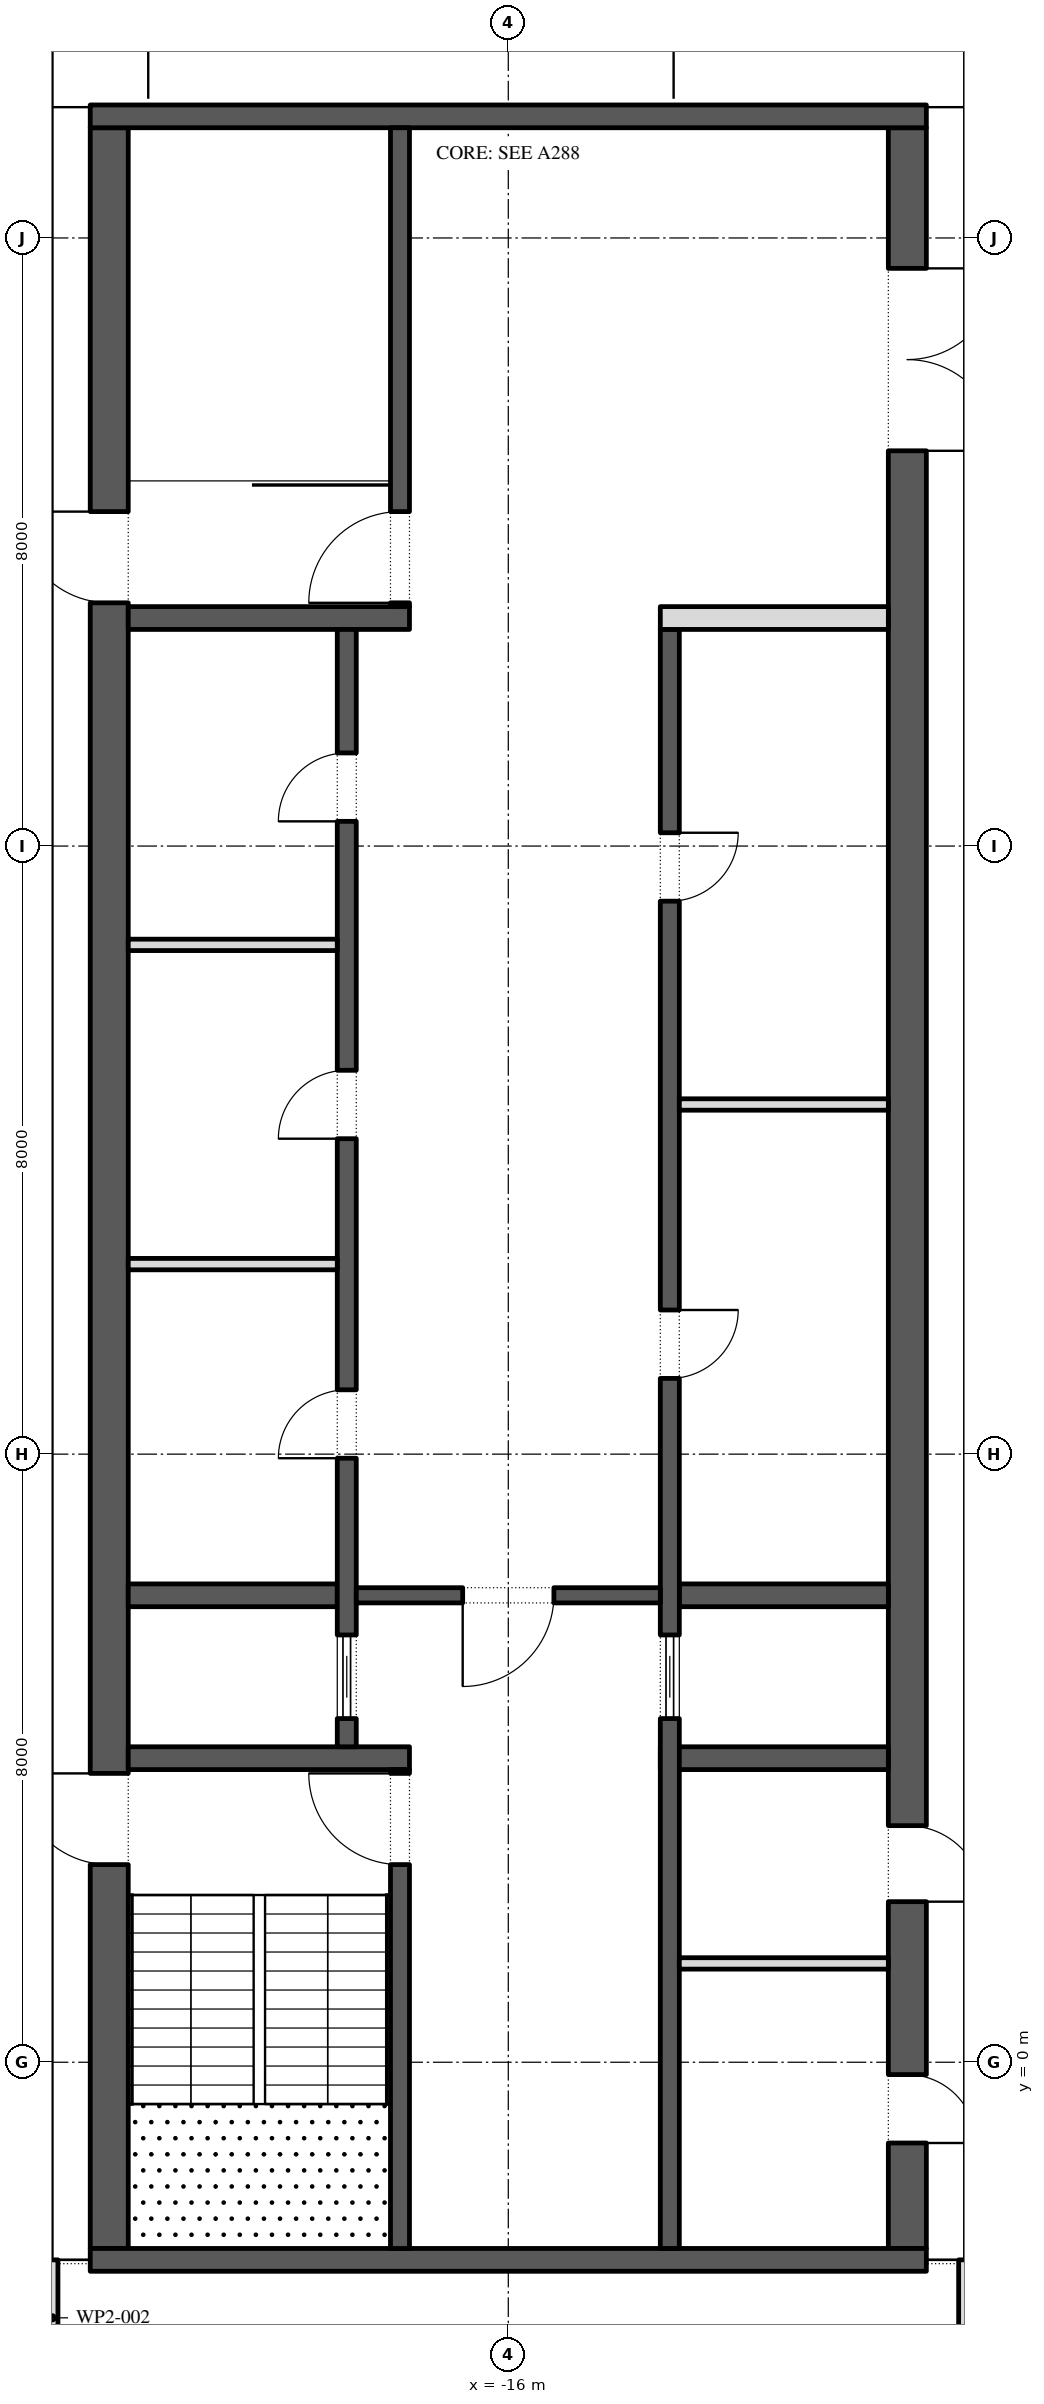
"""IFC4 building model, lengths in metres.
Left out: names, types, materials, properties, quantities, classifications, styles, units other than length and angle.
Written with IfcOpenShell. Run it as: python <this file> out.ifc"""

import sys

from ifc_helpers import new_model, si_unit, direction, frame, frame_2d, origin, place, context, subcontext, project, spatial, rectangle, extrude, element, fill, save


model = new_model("IFC4")
c1 = context("Model", 3, precision=1e-05, world=origin(), true_north=direction((0.0, 1.0)))
c2 = subcontext(c1, "Body", "Model", "MODEL_VIEW")
j1 = project(units=[si_unit("LENGTHUNIT", "METRE"), si_unit("PLANEANGLEUNIT", "RADIAN")], contexts=[c1])
p1 = place(None, origin())
s1 = spatial("IfcSite", under=j1, at=p1, CompositionType="ELEMENT")
p2 = place(p1, origin())
s2 = spatial("IfcBuilding", under=s1, at=p2, CompositionType="ELEMENT")
p3 = place(p2, frame((0.0, 0.0, 385.8)))
s3 = spatial("IfcBuildingStorey", under=s2, at=p3, CompositionType="ELEMENT", Elevation=385.8)
p4 = place(p3, frame((-21.25, -2.45, 0.0), z_axis=(0.0, 0.0, 1.0), x_axis=(0.0, 1.0, 0.0)))
e1 = element("IfcWall", 1, at=p4, inside=s3, PredefinedType="SHEAR", context=c2, shape_type="SweptSolid", body=[
    extrude(rectangle(XDim=27.9, YDim=0.5, at=frame_2d((13.95, 0.0))), origin(), (0.0, 0.0, 1.0), 4.0),
])
p5 = place(p4, frame((5.05, 0.0, 0.0)))
e2 = element("IfcOpeningElement", 2, at=p5, cuts=e1, PredefinedType="OPENING", context=c2, shape_type="SweptSolid", body=[
    extrude(rectangle(XDim=1.2, YDim=2.1, at=frame_2d((0.6, 1.05))), frame((0.0, 0.26, 0.0), z_axis=(0.0, -1.0, 0.0), x_axis=(1.0, 0.0, 0.0)), (0.0, 0.0, 1.0), 0.52),
])
p6 = place(p4, frame((21.65, 0.0, 0.0)))
e3 = element("IfcOpeningElement", 3, at=p6, cuts=e1, PredefinedType="OPENING", context=c2, shape_type="SweptSolid", body=[
    extrude(rectangle(XDim=1.2, YDim=2.1, at=frame_2d((0.6, 1.05))), frame((0.0, 0.26, 0.0), z_axis=(0.0, -1.0, 0.0), x_axis=(1.0, 0.0, 0.0)), (0.0, 0.0, 1.0), 0.52),
])
p7 = place(p3, frame((-10.75, -2.45, 0.0), z_axis=(0.0, 0.0, 1.0), x_axis=(0.0, 1.0, 0.0)))
e4 = element("IfcWall", 4, at=p7, inside=s3, PredefinedType="SHEAR", context=c2, shape_type="SweptSolid", body=[
    extrude(rectangle(XDim=27.9, YDim=0.5, at=frame_2d((13.95, 0.0))), origin(), (0.0, 0.0, 1.0), 4.0),
])
p8 = place(p7, frame((23.65, 0.0, 0.0)))
e5 = element("IfcOpeningElement", 5, at=p8, cuts=e4, PredefinedType="OPENING", context=c2, shape_type="SweptSolid", body=[
    extrude(rectangle(XDim=2.4, YDim=2.1, at=frame_2d((1.2, 1.05))), frame((0.0, 0.26, 0.0), z_axis=(0.0, -1.0, 0.0), x_axis=(1.0, 0.0, 0.0)), (0.0, 0.0, 1.0), 0.52),
])
p9 = place(p7, frame((1.387, 0.0, 0.0)))
e6 = element("IfcOpeningElement", 6, at=p9, cuts=e4, PredefinedType="OPENING", context=c2, shape_type="SweptSolid", body=[
    extrude(rectangle(XDim=0.9, YDim=2.1, at=frame_2d((0.45, 1.05))), frame((0.0, 0.26, 0.0), z_axis=(0.0, -1.0, 0.0), x_axis=(1.0, 0.0, 0.0)), (0.0, 0.0, 1.0), 0.52),
])
p10 = place(p7, frame((4.562, 0.0, 0.0)))
e7 = element("IfcOpeningElement", 7, at=p10, cuts=e4, PredefinedType="OPENING", context=c2, shape_type="SweptSolid", body=[
    extrude(rectangle(XDim=1.0, YDim=2.1, at=frame_2d((0.5, 1.05))), frame((0.0, 0.26, 0.0), z_axis=(0.0, -1.0, 0.0), x_axis=(1.0, 0.0, 0.0)), (0.0, 0.0, 1.0), 0.52),
])
for number, where, z_axis, x_axis in (
    (8, (-21.5, -2.6, 0.0), (0.0, 0.0, 1.0), (1.0, 0.0, 0.0)),
    (9, (-21.5, 25.6, 0.0), (0.0, 0.0, 1.0), (1.0, 0.0, 0.0)),
):
    element("IfcWall", number, at=place(p3, frame(where, z_axis=z_axis, x_axis=x_axis)), inside=s3, PredefinedType="SHEAR", context=c2, shape_type="SweptSolid", body=[
        extrude(rectangle(XDim=11.0, YDim=0.3, at=frame_2d((5.5, 0.0))), origin(), (0.0, 0.0, 1.0), 4.0),
    ])
p11 = place(p3, frame((-21.0, 4.0, 0.0), z_axis=(0.0, 0.0, 1.0), x_axis=(1.0, 0.0, 0.0)))
e10 = element("IfcWall", 10, at=p11, inside=s3, PredefinedType="SHEAR", context=c2, shape_type="SweptSolid", body=[
    extrude(rectangle(XDim=3.7, YDim=0.3, at=frame_2d((1.85, 0.0))), origin(), (0.0, 0.0, 1.0), 4.0),
])
p12 = place(p3, frame((-17.425, -2.45, 0.0), z_axis=(0.0, 0.0, 1.0), x_axis=(0.0, 1.0, 0.0)))
e11 = element("IfcWall", 11, at=p12, inside=s3, PredefinedType="SHEAR", context=c2, shape_type="SweptSolid", body=[
    extrude(rectangle(XDim=6.3, YDim=0.25, at=frame_2d((3.15, 0.0))), origin(), (0.0, 0.0, 1.0), 4.0),
])
p13 = place(p12, frame((5.05, 0.0, 0.0)))
e12 = element("IfcOpeningElement", 12, at=p13, cuts=e11, PredefinedType="OPENING", context=c2, shape_type="SweptSolid", body=[
    extrude(rectangle(XDim=1.2, YDim=2.1, at=frame_2d((0.6, 1.05))), frame((0.0, 0.135, 0.0), z_axis=(0.0, -1.0, 0.0), x_axis=(1.0, 0.0, 0.0)), (0.0, 0.0, 1.0), 0.27),
])
p14 = place(p3, frame((-21.0, 19.0, 0.0), z_axis=(0.0, 0.0, 1.0), x_axis=(1.0, 0.0, 0.0)))
e13 = element("IfcWall", 13, at=p14, inside=s3, PredefinedType="SHEAR", context=c2, shape_type="SweptSolid", body=[
    extrude(rectangle(XDim=3.7, YDim=0.3, at=frame_2d((1.85, 0.0))), origin(), (0.0, 0.0, 1.0), 4.0),
])
p15 = place(p3, frame((-17.425, 19.15, 0.0), z_axis=(0.0, 0.0, 1.0), x_axis=(0.0, 1.0, 0.0)))
e14 = element("IfcWall", 14, at=p15, inside=s3, PredefinedType="SHEAR", context=c2, shape_type="SweptSolid", body=[
    extrude(rectangle(XDim=6.3, YDim=0.25, at=frame_2d((3.15, 0.0))), origin(), (0.0, 0.0, 1.0), 4.0),
])
p16 = place(p15, frame((0.05, 0.0, 0.0)))
e15 = element("IfcOpeningElement", 15, at=p16, cuts=e14, PredefinedType="OPENING", context=c2, shape_type="SweptSolid", body=[
    extrude(rectangle(XDim=1.2, YDim=2.1, at=frame_2d((0.6, 1.05))), frame((0.0, 0.135, 0.0), z_axis=(0.0, -1.0, 0.0), x_axis=(1.0, 0.0, 0.0)), (0.0, 0.0, 1.0), 0.27),
])
p17 = place(p3, frame((-21.0, 6.143, 0.0), z_axis=(0.0, 0.0, 1.0), x_axis=(1.0, 0.0, 0.0)))
e16 = element("IfcWall", 16, at=p17, inside=s3, PredefinedType="SHEAR", context=c2, shape_type="SweptSolid", body=[
    extrude(rectangle(XDim=2.75, YDim=0.3, at=frame_2d((1.375, 0.0))), origin(), (0.0, 0.0, 1.0), 4.0),
])
p18 = place(p3, frame((-18.125, 4.15, 0.0), z_axis=(0.0, 0.0, 1.0), x_axis=(0.0, 1.0, 0.0)))
e17 = element("IfcWall", 17, at=p18, inside=s3, PredefinedType="SHEAR", context=c2, shape_type="SweptSolid", body=[
    extrude(rectangle(XDim=14.7, YDim=0.25, at=frame_2d((7.35, 0.0))), origin(), (0.0, 0.0, 1.0), 4.0),
])
p19 = place(p18, frame((3.796, 0.0, 0.0)))
e18 = element("IfcOpeningElement", 18, at=p19, cuts=e17, PredefinedType="OPENING", context=c2, shape_type="SweptSolid", body=[
    extrude(rectangle(XDim=0.9, YDim=2.1, at=frame_2d((0.45, 1.05))), frame((0.0, 0.135, 0.0), z_axis=(0.0, -1.0, 0.0), x_axis=(1.0, 0.0, 0.0)), (0.0, 0.0, 1.0), 0.27),
])
p20 = place(p18, frame((8.0, 0.0, 0.0)))
e19 = element("IfcOpeningElement", 19, at=p20, cuts=e17, PredefinedType="OPENING", context=c2, shape_type="SweptSolid", body=[
    extrude(rectangle(XDim=0.9, YDim=2.1, at=frame_2d((0.45, 1.05))), frame((0.0, 0.135, 0.0), z_axis=(0.0, -1.0, 0.0), x_axis=(1.0, 0.0, 0.0)), (0.0, 0.0, 1.0), 0.27),
])
p21 = place(p18, frame((12.175, 0.0, 0.0)))
e20 = element("IfcOpeningElement", 20, at=p21, cuts=e17, PredefinedType="OPENING", context=c2, shape_type="SweptSolid", body=[
    extrude(rectangle(XDim=0.9, YDim=2.1, at=frame_2d((0.45, 1.05))), frame((0.0, 0.135, 0.0), z_axis=(0.0, -1.0, 0.0), x_axis=(1.0, 0.0, 0.0)), (0.0, 0.0, 1.0), 0.27),
])
p22 = place(p18, frame((0.371, 0.0, 0.0)))
e21 = element("IfcOpeningElement", 21, at=p22, cuts=e17, PredefinedType="OPENING", context=c2, shape_type="SweptSolid", body=[
    extrude(rectangle(XDim=1.1, YDim=2.1, at=frame_2d((0.55, 1.05))), frame((0.0, 0.135, 0.0), z_axis=(0.0, -1.0, 0.0), x_axis=(1.0, 0.0, 0.0)), (0.0, 0.0, 1.0), 0.27),
])
for number, where, z_axis, x_axis in (
    (22, (-21.0, 10.5, 0.0), (0.0, 0.0, 1.0), (1.0, 0.0, 0.0)),
    (23, (-21.0, 14.7, 0.0), (0.0, 0.0, 1.0), (1.0, 0.0, 0.0)),
):
    element("IfcWall", number, at=place(p3, frame(where, z_axis=z_axis, x_axis=x_axis)), inside=s3, PredefinedType="PARTITIONING", context=c2, shape_type="SweptSolid", body=[
        extrude(rectangle(XDim=2.75, YDim=0.15, at=frame_2d((1.375, 0.0))), origin(), (0.0, 0.0, 1.0), 4.0),
    ])
p23 = place(p3, frame((-14.0, 4.0, 0.0), z_axis=(0.0, 0.0, 1.0), x_axis=(1.0, 0.0, 0.0)))
e24 = element("IfcWall", 24, at=p23, inside=s3, PredefinedType="SHEAR", context=c2, shape_type="SweptSolid", body=[
    extrude(rectangle(XDim=3.0, YDim=0.3, at=frame_2d((1.5, 0.0))), origin(), (0.0, 0.0, 1.0), 4.0),
])
p24 = place(p3, frame((-13.75, 6.143, 0.0), z_axis=(0.0, 0.0, 1.0), x_axis=(1.0, 0.0, 0.0)))
e25 = element("IfcWall", 25, at=p24, inside=s3, PredefinedType="SHEAR", context=c2, shape_type="SweptSolid", body=[
    extrude(rectangle(XDim=2.75, YDim=0.3, at=frame_2d((1.375, 0.0))), origin(), (0.0, 0.0, 1.0), 4.0),
])
p25 = place(p3, frame((-13.875, -2.45, 0.0), z_axis=(0.0, 0.0, 1.0), x_axis=(0.0, 1.0, 0.0)))
e26 = element("IfcWall", 26, at=p25, inside=s3, PredefinedType="SHEAR", context=c2, shape_type="SweptSolid", body=[
    extrude(rectangle(XDim=21.3, YDim=0.25, at=frame_2d((10.65, 0.0))), origin(), (0.0, 0.0, 1.0), 4.0),
])
p26 = place(p25, frame((11.446, 0.0, 0.0)))
e27 = element("IfcOpeningElement", 27, at=p26, cuts=e26, PredefinedType="OPENING", context=c2, shape_type="SweptSolid", body=[
    extrude(rectangle(XDim=0.9, YDim=2.1, at=frame_2d((0.45, 1.05))), frame((0.0, 0.135, 0.0), z_axis=(0.0, -1.0, 0.0), x_axis=(1.0, 0.0, 0.0)), (0.0, 0.0, 1.0), 0.27),
])
p27 = place(p25, frame((17.725, 0.0, 0.0)))
e28 = element("IfcOpeningElement", 28, at=p27, cuts=e26, PredefinedType="OPENING", context=c2, shape_type="SweptSolid", body=[
    extrude(rectangle(XDim=0.9, YDim=2.1, at=frame_2d((0.45, 1.05))), frame((0.0, 0.135, 0.0), z_axis=(0.0, -1.0, 0.0), x_axis=(1.0, 0.0, 0.0)), (0.0, 0.0, 1.0), 0.27),
])
p28 = place(p25, frame((6.971, 0.0, 0.0)))
e29 = element("IfcOpeningElement", 29, at=p28, cuts=e26, PredefinedType="OPENING", context=c2, shape_type="SweptSolid", body=[
    extrude(rectangle(XDim=1.1, YDim=2.1, at=frame_2d((0.55, 1.05))), frame((0.0, 0.135, 0.0), z_axis=(0.0, -1.0, 0.0), x_axis=(1.0, 0.0, 0.0)), (0.0, 0.0, 1.0), 0.27),
])
p29 = place(p3, frame((-14.0, 19.0, 0.0), z_axis=(0.0, 0.0, 1.0), x_axis=(1.0, 0.0, 0.0)))
e30 = element("IfcWall", 30, at=p29, inside=s3, PredefinedType="PARTITIONING", context=c2, shape_type="SweptSolid", body=[
    extrude(rectangle(XDim=3.0, YDim=0.3, at=frame_2d((1.5, 0.0))), origin(), (0.0, 0.0, 1.0), 4.0),
])
p30 = place(p3, frame((-13.75, 12.6, 0.0), z_axis=(0.0, 0.0, 1.0), x_axis=(1.0, 0.0, 0.0)))
e31 = element("IfcWall", 31, at=p30, inside=s3, PredefinedType="PARTITIONING", context=c2, shape_type="SweptSolid", body=[
    extrude(rectangle(XDim=2.75, YDim=0.15, at=frame_2d((1.375, 0.0))), origin(), (0.0, 0.0, 1.0), 4.0),
])
p31 = place(p3, frame((-18.0, 6.143, 0.0), z_axis=(0.0, 0.0, 1.0), x_axis=(1.0, 0.0, 0.0)))
e32 = element("IfcWall", 32, at=p31, inside=s3, PredefinedType="SHEAR", context=c2, shape_type="SweptSolid", body=[
    extrude(rectangle(XDim=4.0, YDim=0.2, at=frame_2d((2.0, 0.0))), origin(), (0.0, 0.0, 1.0), 4.0),
])
p32 = place(p31, frame((1.4, 0.0, 0.0)))
e33 = element("IfcOpeningElement", 33, at=p32, cuts=e32, PredefinedType="OPENING", context=c2, shape_type="SweptSolid", body=[
    extrude(rectangle(XDim=1.2, YDim=2.1, at=frame_2d((0.6, 1.05))), frame((0.0, 0.11, 0.0), z_axis=(0.0, -1.0, 0.0), x_axis=(1.0, 0.0, 0.0)), (0.0, 0.0, 1.0), 0.22),
])
p33 = place(p3, frame((-13.75, 1.3, 0.0), z_axis=(0.0, 0.0, 1.0), x_axis=(1.0, 0.0, 0.0)))
e34 = element("IfcWall", 34, at=p33, inside=s3, PredefinedType="PARTITIONING", context=c2, shape_type="SweptSolid", body=[
    extrude(rectangle(XDim=2.75, YDim=0.15, at=frame_2d((1.375, 0.0))), origin(), (0.0, 0.0, 1.0), 4.0),
])
p34 = place(p3, frame((-22.0, -2.6, 0.0), z_axis=(0.0, 0.0, 1.0), x_axis=(0.0, -1.0, 0.0)))
e35 = element("IfcWall", 35, at=p34, inside=s3, PredefinedType="PARTITIONING", context=c2, shape_type="SweptSolid", body=[
    extrude(rectangle(XDim=1.525, YDim=0.15, at=frame_2d((0.762, 0.0))), origin(), (0.0, 0.0, 1.0), 4.0),
])
p35 = place(p3, frame((-10.0, -5.8, 0.0), z_axis=(0.0, 0.0, 1.0), x_axis=(0.0, 1.0, 0.0)))
e36 = element("IfcWall", 36, at=p35, inside=s3, PredefinedType="PARTITIONING", context=c2, shape_type="SweptSolid", body=[
    extrude(rectangle(XDim=3.2, YDim=0.15, at=frame_2d((1.6, 0.0))), origin(), (0.0, 0.0, 1.0), 4.0),
])
p36 = place(p35, frame((0.3, 0.0, 0.0)))
e37 = element("IfcOpeningElement", 37, at=p36, cuts=e36, PredefinedType="OPENING", context=c2, shape_type="SweptSolid", body=[
    extrude(rectangle(XDim=1.0, YDim=2.1, at=frame_2d((0.5, 1.05))), frame((0.0, 0.085, 0.0), z_axis=(0.0, -1.0, 0.0), x_axis=(1.0, 0.0, 0.0)), (0.0, 0.0, 1.0), 0.17),
])
p37 = place(p19, origin())
e38 = element("IfcDoor", 38, at=p37, inside=s3, OperationType="SINGLE_SWING_RIGHT", PredefinedType="DOOR", context=c2, shape_type="SweptSolid", body=[
    extrude(rectangle(XDim=0.9, YDim=2.1, at=frame_2d((0.45, 1.05))), frame((0.0, 0.125, 0.0), z_axis=(0.0, -1.0, 0.0), x_axis=(1.0, 0.0, 0.0)), (0.0, 0.0, 1.0), 0.05),
])
fill(e18, e38)
p38 = place(p20, origin())
e39 = element("IfcDoor", 39, at=p38, inside=s3, OperationType="SINGLE_SWING_RIGHT", PredefinedType="DOOR", context=c2, shape_type="SweptSolid", body=[
    extrude(rectangle(XDim=0.9, YDim=2.1, at=frame_2d((0.45, 1.05))), frame((0.0, 0.125, 0.0), z_axis=(0.0, -1.0, 0.0), x_axis=(1.0, 0.0, 0.0)), (0.0, 0.0, 1.0), 0.05),
])
fill(e19, e39)
p39 = place(p21, origin())
e40 = element("IfcDoor", 40, at=p39, inside=s3, OperationType="SINGLE_SWING_RIGHT", PredefinedType="DOOR", context=c2, shape_type="SweptSolid", body=[
    extrude(rectangle(XDim=0.9, YDim=2.1, at=frame_2d((0.45, 1.05))), frame((0.0, 0.125, 0.0), z_axis=(0.0, -1.0, 0.0), x_axis=(1.0, 0.0, 0.0)), (0.0, 0.0, 1.0), 0.05),
])
fill(e20, e40)
p40 = place(p22, origin())
e41 = element("IfcDoor", 41, at=p40, inside=s3, OperationType="SLIDING_TO_LEFT", PredefinedType="DOOR", context=c2, shape_type="SweptSolid", body=[
    extrude(rectangle(XDim=1.1, YDim=2.1, at=frame_2d((0.55, 1.05))), frame((0.0, 0.025, 0.0), z_axis=(0.0, -1.0, 0.0), x_axis=(1.0, 0.0, 0.0)), (0.0, 0.0, 1.0), 0.05),
])
fill(e21, e41)
p41 = place(p26, frame((0.9, -0.2, 0.0), z_axis=(0.0, 0.0, 1.0), x_axis=(-1.0, 0.0, 0.0)))
e42 = element("IfcDoor", 42, at=p41, inside=s3, OperationType="SINGLE_SWING_RIGHT", PredefinedType="DOOR", context=c2, shape_type="SweptSolid", body=[
    extrude(rectangle(XDim=0.9, YDim=2.1, at=frame_2d((0.45, 1.05))), frame((0.0, -0.075, 0.0), z_axis=(0.0, -1.0, 0.0), x_axis=(1.0, 0.0, 0.0)), (0.0, 0.0, 1.0), 0.05),
])
fill(e27, e42)
p42 = place(p27, frame((0.9, -0.2, 0.0), z_axis=(0.0, 0.0, 1.0), x_axis=(-1.0, 0.0, 0.0)))
e43 = element("IfcDoor", 43, at=p42, inside=s3, OperationType="SINGLE_SWING_RIGHT", PredefinedType="DOOR", context=c2, shape_type="SweptSolid", body=[
    extrude(rectangle(XDim=0.9, YDim=2.1, at=frame_2d((0.45, 1.05))), frame((0.0, -0.075, 0.0), z_axis=(0.0, -1.0, 0.0), x_axis=(1.0, 0.0, 0.0)), (0.0, 0.0, 1.0), 0.05),
])
fill(e28, e43)
p43 = place(p28, origin())
e44 = element("IfcDoor", 44, at=p43, inside=s3, OperationType="SLIDING_TO_LEFT", PredefinedType="DOOR", context=c2, shape_type="SweptSolid", body=[
    extrude(rectangle(XDim=1.1, YDim=2.1, at=frame_2d((0.55, 1.05))), frame((0.0, 0.025, 0.0), z_axis=(0.0, -1.0, 0.0), x_axis=(1.0, 0.0, 0.0)), (0.0, 0.0, 1.0), 0.05),
])
fill(e29, e44)
p44 = place(p32, frame((1.2, 0.0, 0.0), z_axis=(0.0, 0.0, 1.0), x_axis=(-1.0, 0.0, 0.0)))
e45 = element("IfcDoor", 45, at=p44, inside=s3, OperationType="SINGLE_SWING_LEFT", PredefinedType="DOOR", context=c2, shape_type="SweptSolid", body=[
    extrude(rectangle(XDim=1.2, YDim=2.1, at=frame_2d((0.6, 1.05))), frame((0.0, 0.025, 0.0), z_axis=(0.0, -1.0, 0.0), x_axis=(1.0, 0.0, 0.0)), (0.0, 0.0, 1.0), 0.05),
])
fill(e33, e45)
p45 = place(p8, frame((2.4, 0.0, 0.0), z_axis=(0.0, 0.0, 1.0), x_axis=(-1.0, 0.0, 0.0)))
e46 = element("IfcDoor", 46, at=p45, inside=s3, OperationType="DOUBLE_DOOR_SINGLE_SWING", PredefinedType="DOOR", context=c2, shape_type="SweptSolid", body=[
    extrude(rectangle(XDim=2.4, YDim=2.1, at=frame_2d((1.2, 1.05))), frame((0.0, 0.025, 0.0), z_axis=(0.0, -1.0, 0.0), x_axis=(1.0, 0.0, 0.0)), (0.0, 0.0, 1.0), 0.05),
])
fill(e5, e46)
p46 = place(p13, origin())
e47 = element("IfcDoor", 47, at=p46, inside=s3, OperationType="SINGLE_SWING_LEFT", PredefinedType="DOOR", context=c2, shape_type="SweptSolid", body=[
    extrude(rectangle(XDim=1.2, YDim=2.1, at=frame_2d((0.6, 1.05))), frame((0.0, 0.025, 0.0), z_axis=(0.0, -1.0, 0.0), x_axis=(1.0, 0.0, 0.0)), (0.0, 0.0, 1.0), 0.05),
])
fill(e12, e47)
p47 = place(p5, origin())
e48 = element("IfcDoor", 48, at=p47, inside=s3, OperationType="SINGLE_SWING_LEFT", PredefinedType="DOOR", context=c2, shape_type="SweptSolid", body=[
    extrude(rectangle(XDim=1.2, YDim=2.1, at=frame_2d((0.6, 1.05))), frame((0.0, 0.025, 0.0), z_axis=(0.0, -1.0, 0.0), x_axis=(1.0, 0.0, 0.0)), (0.0, 0.0, 1.0), 0.05),
])
fill(e2, e48)
p48 = place(p16, origin())
e49 = element("IfcDoor", 49, at=p48, inside=s3, OperationType="SINGLE_SWING_RIGHT", PredefinedType="DOOR", context=c2, shape_type="SweptSolid", body=[
    extrude(rectangle(XDim=1.2, YDim=2.1, at=frame_2d((0.6, 1.05))), frame((0.0, 0.025, 0.0), z_axis=(0.0, -1.0, 0.0), x_axis=(1.0, 0.0, 0.0)), (0.0, 0.0, 1.0), 0.05),
])
fill(e15, e49)
p49 = place(p6, origin())
e50 = element("IfcDoor", 50, at=p49, inside=s3, OperationType="SINGLE_SWING_LEFT", PredefinedType="DOOR", context=c2, shape_type="SweptSolid", body=[
    extrude(rectangle(XDim=1.2, YDim=2.1, at=frame_2d((0.6, 1.05))), frame((0.0, 0.025, 0.0), z_axis=(0.0, -1.0, 0.0), x_axis=(1.0, 0.0, 0.0)), (0.0, 0.0, 1.0), 0.05),
])
fill(e3, e50)
p50 = place(p9, frame((0.9, 0.45, 0.0), z_axis=(0.0, 0.0, 1.0), x_axis=(-1.0, 0.0, 0.0)))
e51 = element("IfcDoor", 51, at=p50, inside=s3, OperationType="SINGLE_SWING_LEFT", PredefinedType="DOOR", context=c2, shape_type="SweptSolid", body=[
    extrude(rectangle(XDim=0.9, YDim=2.1, at=frame_2d((0.45, 1.05))), frame((0.0, 0.25, 0.0), z_axis=(0.0, -1.0, 0.0), x_axis=(1.0, 0.0, 0.0)), (0.0, 0.0, 1.0), 0.05),
])
fill(e6, e51)
p51 = place(p10, frame((1.0, 0.45, 0.0), z_axis=(0.0, 0.0, 1.0), x_axis=(-1.0, 0.0, 0.0)))
e52 = element("IfcDoor", 52, at=p51, inside=s3, OperationType="SINGLE_SWING_LEFT", PredefinedType="DOOR", context=c2, shape_type="SweptSolid", body=[
    extrude(rectangle(XDim=1.0, YDim=2.1, at=frame_2d((0.5, 1.05))), frame((0.0, 0.25, 0.0), z_axis=(0.0, -1.0, 0.0), x_axis=(1.0, 0.0, 0.0)), (0.0, 0.0, 1.0), 0.05),
])
fill(e7, e52)
save(model, sys.argv[1])
